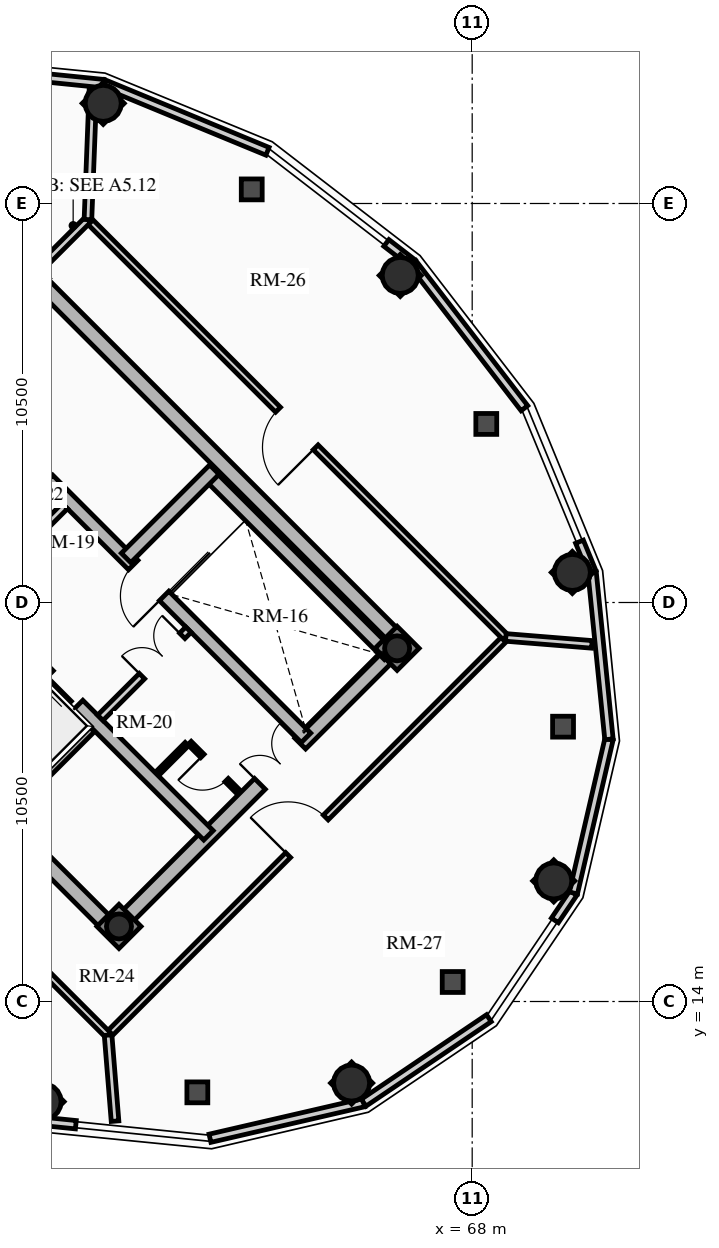
"""IFC4 building model, lengths in metres.
Left out: names, types, materials, properties, quantities, classifications, styles, units other than length and angle.
Written with IfcOpenShell. Run it as: python <this file> out.ifc"""

import sys

from ifc_helpers import new_model, si_unit, direction, frame, frame_2d, origin, origin_2d, place, context, subcontext, project, spatial, rectangle, circle, hollow_circle, extrude, source, transform, mapped, element, fill, save


model = new_model("IFC4")
c1 = context("Model", 3, precision=1e-05, world=origin(), true_north=direction((0.0, 1.0)))
c2 = subcontext(c1, "Body", "Model", "MODEL_VIEW")
j1 = project(units=[si_unit("LENGTHUNIT", "METRE"), si_unit("PLANEANGLEUNIT", "RADIAN")], contexts=[c1])
p1 = place(None, origin())
s1 = spatial("IfcSite", under=j1, at=p1, CompositionType="ELEMENT")
p2 = place(p1, origin())
s2 = spatial("IfcBuilding", under=s1, at=p2, CompositionType="ELEMENT")
p3 = place(p2, frame((0.0, 0.0, 240.33)))
s3 = spatial("IfcBuildingStorey", under=s2, at=p3, CompositionType="ELEMENT", Elevation=240.33)
for number, where, z_axis, x_axis in (
    (1, (58.702, 15.732, 0.0), (0.0, 0.0, 1.0), (-0.707, 0.707, 0.0)),
    (2, (66.268, 23.298, 0.0), (0.0, 0.0, 1.0), (-0.707, 0.707, 0.0)),
):
    element("IfcWall", number, at=place(p3, frame(where, z_axis=z_axis, x_axis=x_axis)), inside=s3, PredefinedType="SHEAR", context=c2, shape_type="SweptSolid", body=[
        extrude(rectangle(XDim=14.1, YDim=0.4, at=frame_2d((7.05, 0.0))), origin(), (0.0, 0.0, 1.0), 4.5),
    ])
p4 = place(p3, frame((58.561, 15.873, 0.0), z_axis=(0.0, 0.0, 1.0), x_axis=(0.707106781187, 0.707106781187, 0.0)))
e3 = element("IfcWall", 3, at=p4, inside=s3, PredefinedType="SHEAR", context=c2, shape_type="SweptSolid", body=[
    extrude(rectangle(XDim=10.7, YDim=0.4, at=frame_2d((5.35, 0.0))), origin(), (0.0, 0.0, 1.0), 4.5),
])
m1 = source(origin(), c2, "Body", "SweptSolid", [
    extrude(rectangle(XDim=1.5, YDim=2.02, at=frame_2d((0.75, 1.01))), frame((0.0, 0.21, 0.0), z_axis=(0.0, -1.0, 0.0), x_axis=(1.0, 0.0, 0.0)), (0.0, 0.0, 1.0), 0.42),
])
p5 = place(p4, frame((5.45, 0.0, 0.0)))
e4 = element("IfcOpeningElement", 4, at=p5, cuts=e3, PredefinedType="OPENING", context=c2, shape_type="MappedRepresentation", body=[
    mapped(m1, transform((0.0, 0.0, 0.0), x_axis=(1.0, 0.0, 0.0), y_axis=(0.0, 1.0, 0.0), z_axis=(0.0, 0.0, 1.0), scale=1.0)),
])
p6 = place(p3, frame((61.06, 18.373, 0.0), z_axis=(0.0, 0.0, 1.0), x_axis=(-0.707106781187, 0.707106781187, 0.0)))
e5 = element("IfcWall", 5, at=p6, inside=s3, PredefinedType="SHEAR", context=c2, shape_type="SweptSolid", body=[
    extrude(rectangle(XDim=13.7, YDim=0.35, at=frame_2d((6.85, 0.0))), origin(), (0.0, 0.0, 1.0), 4.5),
])
m2 = source(origin(), c2, "Body", "SweptSolid", [
    extrude(rectangle(XDim=1.1, YDim=2.015, at=frame_2d((0.55, 1.007))), frame((0.0, 0.185, 0.0), z_axis=(0.0, -1.0, 0.0), x_axis=(1.0, 0.0, 0.0)), (0.0, 0.0, 1.0), 0.37),
])
p7 = place(p6, frame((4.85, 0.0, 0.0)))
e6 = element("IfcOpeningElement", 6, at=p7, cuts=e5, PredefinedType="OPENING", context=c2, shape_type="MappedRepresentation", body=[
    mapped(m2, transform((0.0, 0.0, 0.0), x_axis=(1.0, 0.0, 0.0), y_axis=(0.0, 1.0, 0.0), z_axis=(0.0, 0.0, 1.0), scale=1.0)),
])
m3 = source(origin(), c2, "Body", "SweptSolid", [
    extrude(rectangle(XDim=1.15, YDim=2.02, at=frame_2d((0.575, 1.01))), frame((0.0, 0.185, 0.0), z_axis=(0.0, -1.0, 0.0), x_axis=(1.0, 0.0, 0.0)), (0.0, 0.0, 1.0), 0.37),
])
p8 = place(p6, frame((7.27, 0.0, 0.0)))
e7 = element("IfcOpeningElement", 7, at=p8, cuts=e5, PredefinedType="OPENING", context=c2, shape_type="MappedRepresentation", body=[
    mapped(m3, transform((0.0, 0.0, 0.0), x_axis=(1.0, 0.0, 0.0), y_axis=(0.0, 1.0, 0.0), z_axis=(0.0, 0.0, 1.0), scale=1.0)),
])
p9 = place(p3, frame((63.627, 20.94, 0.0), z_axis=(0.0, 0.0, 1.0), x_axis=(-0.707119496762, 0.707094065383, 0.0)))
e8 = element("IfcWall", 8, at=p9, inside=s3, PredefinedType="SHEAR", context=c2, shape_type="SweptSolid", body=[
    extrude(rectangle(XDim=9.6, YDim=0.35, at=frame_2d((4.8, 0.0))), origin(), (0.0, 0.0, 1.0), 4.5),
])
p10 = place(p9, frame((5.28, 0.0, 0.0)))
e9 = element("IfcOpeningElement", 9, at=p10, cuts=e8, PredefinedType="OPENING", context=c2, shape_type="MappedRepresentation", body=[
    mapped(m3, transform((0.0, 0.0, 0.0), x_axis=(1.0, 0.0, 0.0), y_axis=(0.0, 1.0, 0.0), z_axis=(0.0, 0.0, 1.0), scale=1.0)),
])
p11 = place(p3, frame((65.812, 23.125, 0.0), z_axis=(0.0, 0.0, 1.0), x_axis=(-0.707106781187, 0.707106781187, 0.0)))
e10 = element("IfcWall", 10, at=p11, inside=s3, PredefinedType="SHEAR", context=c2, shape_type="SweptSolid", body=[
    extrude(rectangle(XDim=6.695, YDim=0.35, at=frame_2d((3.348, 0.0))), origin(), (0.0, 0.0, 1.0), 4.5),
])
p12 = place(p3, frame((58.893, 25.674, 0.0), z_axis=(0.0, 0.0, 1.0), x_axis=(0.707106781187, 0.707106781187, 0.0)))
e11 = element("IfcWall", 11, at=p12, inside=s3, PredefinedType="SHEAR", context=c2, shape_type="SweptSolid", body=[
    extrude(rectangle(XDim=3.285, YDim=0.35, at=frame_2d((1.643, 0.0))), origin(), (0.0, 0.0, 1.0), 4.5),
])
for number, where, z_axis, x_axis in (
    (12, (58.706, 15.976, 0.0), (0.0, 0.0, 1.0), (0.707, 0.707, 0.0)),
    (13, (66.024, 23.294, 0.0), (0.0, 0.0, 1.0), (0.707, 0.707, 0.0)),
):
    element("IfcColumn", number, at=place(p3, frame(where, z_axis=z_axis, x_axis=x_axis)), inside=s3, PredefinedType="COLUMN", context=c2, shape_type="SweptSolid", body=[
        extrude(hollow_circle(Radius=0.33, WallThickness=0.025, at=origin_2d()), origin(), (0.0, 0.0, 1.0), 4.5),
    ])
for number, where, z_axis, x_axis in (
    (14, (66.107, 33.107, 0.0), (0.0, 0.0, 1.0), (1.0, 0.0, 0.0)),
    (15, (58.291, 37.635, 0.0), (0.0, 0.0, 1.0), (1.0, 0.0, 0.0)),
    (16, (56.709, 11.365, 0.0), (0.0, 0.0, 1.0), (1.0, 0.0, 0.0)),
    (17, (64.827, 11.854, 0.0), (0.0, 0.0, 1.0), (1.0, 0.0, 0.0)),
    (18, (70.146, 17.173, 0.0), (0.0, 0.0, 1.0), (1.0, 0.0, 0.0)),
    (19, (70.635, 25.291, 0.0), (0.0, 0.0, 1.0), (1.0, 0.0, 0.0)),
):
    element("IfcColumn", number, at=place(p3, frame(where, z_axis=z_axis, x_axis=x_axis)), inside=s3, PredefinedType="COLUMN", context=c2, shape_type="SweptSolid", body=[
        extrude(circle(Radius=0.475, at=origin_2d()), origin(), (0.0, 0.0, 1.0), 4.5),
    ])
p13 = place(p3, frame((65.742, 33.962, 0.0), z_axis=(0.0, 0.0, 1.0), x_axis=(0.792154336817, -0.610320822734, 0.0)))
e20 = element("IfcWall", 20, at=p13, inside=s3, PredefinedType="SOLIDWALL", context=c2, shape_type="SweptSolid", body=[
    extrude(rectangle(XDim=0.87, YDim=0.22, at=frame_2d((0.435, 0.0))), origin(), (0.0, 0.0, 1.0), 3.556),
])
p14 = place(p3, frame((58.295, 38.155, 0.0), z_axis=(0.0, 0.0, 1.0), x_axis=(0.924447353237, -0.381309704956, 0.0)))
e21 = element("IfcWall", 21, at=p14, inside=s3, PredefinedType="SOLIDWALL", context=c2, shape_type="SweptSolid", body=[
    extrude(rectangle(XDim=4.671, YDim=0.22, at=frame_2d((2.335, 0.0))), origin(), (0.0, 0.0, 1.0), 3.556),
])
p15 = place(p3, frame((53.9, 38.599, 0.0), z_axis=(0.0, 0.0, 1.0), x_axis=(0.994929930991, -0.100570534541, 0.0)))
e22 = element("IfcWall", 22, at=p15, inside=s3, PredefinedType="SOLIDWALL", context=c2, shape_type="SweptSolid", body=[
    extrude(rectangle(XDim=4.418, YDim=0.22, at=frame_2d((2.209, 0.0))), origin(), (0.0, 0.0, 1.0), 3.556),
])
p16 = place(p3, frame((57.57, 10.758, 0.0), z_axis=(0.0, 0.0, 1.0), x_axis=(-0.994914209363, 0.100725945054, 0.0)))
e23 = element("IfcWall", 23, at=p16, inside=s3, PredefinedType="SOLIDWALL", context=c2, shape_type="SweptSolid", body=[
    extrude(rectangle(XDim=0.87, YDim=0.22, at=frame_2d((0.435, 0.0))), origin(), (0.0, 0.0, 1.0), 3.556),
])
p17 = place(p3, frame((65.144, 11.337, 0.0), z_axis=(0.0, 0.0, 1.0), x_axis=(-0.974249228678, -0.225473813158, 0.0)))
e24 = element("IfcWall", 24, at=p17, inside=s3, PredefinedType="SOLIDWALL", context=c2, shape_type="SweptSolid", body=[
    extrude(rectangle(XDim=4.15, YDim=0.22, at=frame_2d((2.075, 0.0))), origin(), (0.0, 0.0, 1.0), 3.556),
])
p18 = place(p3, frame((68.439, 13.561, 0.0), z_axis=(0.0, 0.0, 1.0), x_axis=(-0.828833723692, -0.559495003079, 0.0)))
e25 = element("IfcWall", 25, at=p18, inside=s3, PredefinedType="SOLIDWALL", context=c2, shape_type="SweptSolid", body=[
    extrude(rectangle(XDim=3.976, YDim=0.22, at=frame_2d((1.988, 0.0))), origin(), (0.0, 0.0, 1.0), 3.556),
])
p19 = place(p3, frame((70.663, 16.856, 0.0), z_axis=(0.0, 0.0, 1.0), x_axis=(-0.559482492851, -0.828842168446, 0.0)))
e26 = element("IfcWall", 26, at=p19, inside=s3, PredefinedType="SOLIDWALL", context=c2, shape_type="SweptSolid", body=[
    extrude(rectangle(XDim=0.87, YDim=0.22, at=frame_2d((0.435, 0.0))), origin(), (0.0, 0.0, 1.0), 3.556),
])
p20 = place(p3, frame((71.599, 20.9, 0.0), z_axis=(0.0, 0.0, 1.0), x_axis=(-0.225473813158, -0.974249228678, 0.0)))
e27 = element("IfcWall", 27, at=p20, inside=s3, PredefinedType="SOLIDWALL", context=c2, shape_type="SweptSolid", body=[
    extrude(rectangle(XDim=4.15, YDim=0.22, at=frame_2d((2.075, 0.0))), origin(), (0.0, 0.0, 1.0), 3.556),
])
p21 = place(p3, frame((71.155, 25.295, 0.0), z_axis=(0.0, 0.0, 1.0), x_axis=(0.100570534541, -0.994929930991, 0.0)))
e28 = element("IfcWall", 28, at=p21, inside=s3, PredefinedType="SOLIDWALL", context=c2, shape_type="SweptSolid", body=[
    extrude(rectangle(XDim=4.418, YDim=0.22, at=frame_2d((2.209, 0.0))), origin(), (0.0, 0.0, 1.0), 3.556),
])
p22 = place(p3, frame((70.823, 26.1, 0.0), z_axis=(0.0, 0.0, 1.0), x_axis=(0.381145028536, -0.924515260676, 0.0)))
e29 = element("IfcWall", 29, at=p22, inside=s3, PredefinedType="SOLIDWALL", context=c2, shape_type="SweptSolid", body=[
    extrude(rectangle(XDim=0.87, YDim=0.22, at=frame_2d((0.435, 0.0))), origin(), (0.0, 0.0, 1.0), 3.556),
])
p23 = place(p3, frame((66.431, 33.431, 0.0), z_axis=(0.0, 0.0, 1.0), x_axis=(0.610523083886, -0.791998462147, 0.0)))
e30 = element("IfcWall", 30, at=p23, inside=s3, PredefinedType="SOLIDWALL", context=c2, shape_type="SweptSolid", body=[
    extrude(rectangle(XDim=4.82, YDim=0.22, at=frame_2d((2.41, 0.0))), origin(), (0.0, 0.0, 1.0), 3.556),
])
p24 = place(p3, frame((55.888, 19.069, 0.0), z_axis=(0.0, 0.0, 1.0), x_axis=(0.707106781187, 0.707106781187, 0.0)))
e31 = element("IfcWall", 31, at=p24, inside=s3, PredefinedType="SHEAR", context=c2, shape_type="SweptSolid", body=[
    extrude(rectangle(XDim=2.97, YDim=0.2, at=frame_2d((1.485, 0.0))), origin(), (0.0, 0.0, 1.0), 4.5),
])
p25 = place(p3, frame((58.214, 21.467, 0.0), z_axis=(0.0, 0.0, 1.0), x_axis=(0.707106781187, 0.707106781187, 0.0)))
e32 = element("IfcWall", 32, at=p25, inside=s3, PredefinedType="PARTITIONING", context=c2, shape_type="SweptSolid", body=[
    extrude(rectangle(XDim=3.28, YDim=0.2, at=frame_2d((1.64, 0.0))), origin(), (0.0, 0.0, 1.0), 4.185),
])
m4 = source(origin(), c2, "Body", "SweptSolid", [
    extrude(rectangle(XDim=1.5, YDim=2.02, at=frame_2d((0.75, 1.01))), frame((0.0, 0.11, 0.0), z_axis=(0.0, -1.0, 0.0), x_axis=(1.0, 0.0, 0.0)), (0.0, 0.0, 1.0), 0.22),
])
p26 = place(p25, frame((1.55, 0.0, 0.0)))
e33 = element("IfcOpeningElement", 33, at=p26, cuts=e32, PredefinedType="OPENING", context=c2, shape_type="MappedRepresentation", body=[
    mapped(m4, transform((0.0, 0.0, 0.0), x_axis=(1.0, 0.0, 0.0), y_axis=(0.0, 1.0, 0.0), z_axis=(0.0, 0.0, 1.0), scale=1.0)),
])
p27 = place(p3, frame((54.961, 24.719, 0.0), z_axis=(0.0, 0.0, 1.0), x_axis=(0.707106781187, 0.707106781187, 0.0)))
e34 = element("IfcWall", 34, at=p27, inside=s3, PredefinedType="PARTITIONING", context=c2, shape_type="SweptSolid", body=[
    extrude(rectangle(XDim=3.28, YDim=0.2, at=frame_2d((1.64, 0.0))), origin(), (0.0, 0.0, 1.0), 4.185),
])
m5 = source(origin(), c2, "Body", "SweptSolid", [
    extrude(rectangle(XDim=0.9, YDim=2.005, at=frame_2d((0.45, 1.002))), frame((0.0, 0.11, 0.0), z_axis=(0.0, -1.0, 0.0), x_axis=(1.0, 0.0, 0.0)), (0.0, 0.0, 1.0), 0.22),
])
p28 = place(p27, frame((0.16, 0.0, 0.0)))
e35 = element("IfcOpeningElement", 35, at=p28, cuts=e34, PredefinedType="OPENING", context=c2, shape_type="MappedRepresentation", body=[
    mapped(m5, transform((0.0, 0.0, 0.0), x_axis=(1.0, 0.0, 0.0), y_axis=(0.0, 1.0, 0.0), z_axis=(0.0, 0.0, 1.0), scale=1.0)),
])
p29 = place(p3, frame((61.835, 19.529, 0.0), z_axis=(0.0, 0.0, 1.0), x_axis=(-0.707174592913, 0.707038962956, 0.0)))
e36 = element("IfcWall", 36, at=p29, inside=s3, PredefinedType="PARTITIONING", context=c2, shape_type="SweptSolid", body=[
    extrude(rectangle(XDim=1.8, YDim=0.125, at=frame_2d((0.9, 0.0))), origin(), (0.0, 0.0, 1.0), 4.185),
])
m6 = source(origin(), c2, "Body", "SweptSolid", [
    extrude(rectangle(XDim=0.9, YDim=2.005, at=frame_2d((0.45, 1.002))), frame((0.0, 0.073, 0.0), z_axis=(0.0, -1.0, 0.0), x_axis=(1.0, 0.0, 0.0)), (0.0, 0.0, 1.0), 0.145),
])
p30 = place(p29, frame((0.42, 0.0, 0.0)))
e37 = element("IfcOpeningElement", 37, at=p30, cuts=e36, PredefinedType="OPENING", context=c2, shape_type="MappedRepresentation", body=[
    mapped(m6, transform((0.0, 0.0, 0.0), x_axis=(1.0, 0.0, 0.0), y_axis=(0.0, 1.0, 0.0), z_axis=(0.0, 0.0, 1.0), scale=1.0)),
])
p31 = place(p3, frame((59.713, 19.996, 0.0), z_axis=(0.0, 0.0, 1.0), x_axis=(0.707217726, 0.706995818963, 0.0)))
e38 = element("IfcWall", 38, at=p31, inside=s3, PredefinedType="PARTITIONING", context=c2, shape_type="SweptSolid", body=[
    extrude(rectangle(XDim=1.1, YDim=0.125, at=frame_2d((0.55, 0.0))), origin(), (0.0, 0.0, 1.0), 4.185),
])
p32 = place(p3, frame((58.419, 13.115, 0.0), z_axis=(0.0, 0.0, 1.0), x_axis=(0.707106781187, 0.707106781187, 0.0)))
e39 = element("IfcWall", 39, at=p32, inside=s3, PredefinedType="PARTITIONING", context=c2, shape_type="SweptSolid", body=[
    extrude(rectangle(XDim=14.8, YDim=0.18, at=frame_2d((7.4, 0.0))), origin(), (0.0, 0.0, 1.0), 3.476),
])
m7 = source(origin(), c2, "Body", "SweptSolid", [
    extrude(rectangle(XDim=1.4, YDim=2.02, at=frame_2d((0.7, 1.01))), frame((0.0, 0.1, 0.0), z_axis=(0.0, -1.0, 0.0), x_axis=(1.0, 0.0, 0.0)), (0.0, 0.0, 1.0), 0.2),
])
p33 = place(p32, frame((6.7, 0.0, 0.0)))
e40 = element("IfcOpeningElement", 40, at=p33, cuts=e39, PredefinedType="OPENING", context=c2, shape_type="MappedRepresentation", body=[
    mapped(m7, transform((0.0, 0.0, 0.0), x_axis=(1.0, 0.0, 0.0), y_axis=(0.0, 1.0, 0.0), z_axis=(0.0, 0.0, 1.0), scale=1.0)),
])
p34 = place(p3, frame((58.419, 13.115, 0.0), z_axis=(0.0, 0.0, 1.0), x_axis=(-0.707106781187, 0.707106781187, 0.0)))
e41 = element("IfcWall", 41, at=p34, inside=s3, PredefinedType="PARTITIONING", context=c2, shape_type="SweptSolid", body=[
    extrude(rectangle(XDim=15.55, YDim=0.18, at=frame_2d((7.775, 0.0))), origin(), (0.0, 0.0, 1.0), 3.476),
])
p35 = place(p34, frame((7.075, 0.0, 0.0)))
e42 = element("IfcOpeningElement", 42, at=p35, cuts=e41, PredefinedType="OPENING", context=c2, shape_type="MappedRepresentation", body=[
    mapped(m7, transform((0.0, 0.0, 0.0), x_axis=(1.0, 0.0, 0.0), y_axis=(0.0, 1.0, 0.0), z_axis=(0.0, 0.0, 1.0), scale=1.0)),
])
p36 = place(p3, frame((68.885, 23.581, 0.0), z_axis=(0.0, 0.0, 1.0), x_axis=(-0.707106781187, 0.707106781187, 0.0)))
e43 = element("IfcWall", 43, at=p36, inside=s3, PredefinedType="PARTITIONING", context=c2, shape_type="SweptSolid", body=[
    extrude(rectangle(XDim=15.55, YDim=0.18, at=frame_2d((7.775, 0.0))), origin(), (0.0, 0.0, 1.0), 3.476),
])
p37 = place(p36, frame((7.075, 0.0, 0.0)))
e44 = element("IfcOpeningElement", 44, at=p37, cuts=e43, PredefinedType="OPENING", context=c2, shape_type="MappedRepresentation", body=[
    mapped(m7, transform((0.0, 0.0, 0.0), x_axis=(1.0, 0.0, 0.0), y_axis=(0.0, 1.0, 0.0), z_axis=(0.0, 0.0, 1.0), scale=1.0)),
])
p38 = place(p3, frame((56.581, 33.268, 0.0), z_axis=(0.0, 0.0, 1.0), x_axis=(0.707040798191, 0.707172758026, 0.0)))
e45 = element("IfcWall", 45, at=p38, inside=s3, PredefinedType="PARTITIONING", context=c2, shape_type="SweptSolid", body=[
    extrude(rectangle(XDim=1.85, YDim=0.2, at=frame_2d((0.925, 0.0))), origin(), (0.0, 0.0, 1.0), 3.476),
])
p39 = place(p3, frame((57.889, 34.576, 0.0), z_axis=(0.0, 0.0, 1.0), x_axis=(0.038606420501, 0.999254494259, 0.0)))
e46 = element("IfcWall", 46, at=p39, inside=s3, PredefinedType="PARTITIONING", context=c2, shape_type="SweptSolid", body=[
    extrude(rectangle(XDim=3.408, YDim=0.2, at=frame_2d((1.704, 0.0))), origin(), (0.0, 0.0, 1.0), 3.476),
])
for number, where, z_axis, x_axis in (
    (47, (68.885, 23.581, 0.0), (0.0, 0.0, 1.0), (0.997, -0.081, 0.0)),
    (48, (58.419, 13.115, 0.0), (0.0, 0.0, 1.0), (0.081, -0.997, 0.0)),
):
    element("IfcWall", number, at=place(p3, frame(where, z_axis=z_axis, x_axis=x_axis)), inside=s3, PredefinedType="PARTITIONING", context=c2, shape_type="SweptSolid", body=[
        extrude(rectangle(XDim=2.271, YDim=0.2, at=frame_2d((1.136, 0.0))), origin(), (0.0, 0.0, 1.0), 3.556),
    ])
m8 = source(origin(), c2, "Body", "SweptSolid", [
    extrude(rectangle(XDim=1.1, YDim=2.015, at=frame_2d((0.55, 1.007))), frame((0.0, 0.025, 0.0), z_axis=(0.0, -1.0, 0.0), x_axis=(1.0, 0.0, 0.0)), (0.0, 0.0, 1.0), 0.05),
])
p40 = place(p7, origin())
e49 = element("IfcDoor", 49, at=p40, inside=s3, OperationType="SLIDING_TO_RIGHT", PredefinedType="DOOR", context=c2, shape_type="MappedRepresentation", body=[
    mapped(m8, transform((0.0, 0.0, 0.0), x_axis=(1.0, 0.0, 0.0), y_axis=(0.0, 1.0, 0.0), z_axis=(0.0, 0.0, 1.0), scale=1.0)),
])
fill(e6, e49)
m9 = source(origin(), c2, "Body", "SweptSolid", [
    extrude(rectangle(XDim=1.15, YDim=2.02, at=frame_2d((0.575, 1.01))), frame((0.0, 0.025, 0.0), z_axis=(0.0, -1.0, 0.0), x_axis=(1.0, 0.0, 0.0)), (0.0, 0.0, 1.0), 0.05),
])
p41 = place(p10, origin())
e50 = element("IfcDoor", 50, at=p41, inside=s3, OperationType="SINGLE_SWING_LEFT", PredefinedType="DOOR", context=c2, shape_type="MappedRepresentation", body=[
    mapped(m9, transform((0.0, 0.0, 0.0), x_axis=(1.0, 0.0, 0.0), y_axis=(0.0, 1.0, 0.0), z_axis=(0.0, 0.0, 1.0), scale=1.0)),
])
fill(e9, e50)
m10 = source(origin(), c2, "Body", "SweptSolid", [
    extrude(rectangle(XDim=1.5, YDim=2.02, at=frame_2d((0.75, 1.01))), frame((0.0, 0.025, 0.0), z_axis=(0.0, -1.0, 0.0), x_axis=(1.0, 0.0, 0.0)), (0.0, 0.0, 1.0), 0.05),
])
p42 = place(p5, origin())
e51 = element("IfcDoor", 51, at=p42, inside=s3, OperationType="DOUBLE_DOOR_SINGLE_SWING", PredefinedType="DOOR", context=c2, shape_type="MappedRepresentation", body=[
    mapped(m10, transform((0.0, 0.0, 0.0), x_axis=(1.0, 0.0, 0.0), y_axis=(0.0, 1.0, 0.0), z_axis=(0.0, 0.0, 1.0), scale=1.0)),
])
fill(e4, e51)
p43 = place(p26, origin())
e52 = element("IfcDoor", 52, at=p43, inside=s3, OperationType="DOUBLE_DOOR_SINGLE_SWING", PredefinedType="DOOR", context=c2, shape_type="MappedRepresentation", body=[
    mapped(m10, transform((0.0, 0.0, 0.0), x_axis=(1.0, 0.0, 0.0), y_axis=(0.0, 1.0, 0.0), z_axis=(0.0, 0.0, 1.0), scale=1.0)),
])
fill(e33, e52)
m11 = source(origin(), c2, "Body", "SweptSolid", [
    extrude(rectangle(XDim=0.9, YDim=2.005, at=frame_2d((0.45, 1.002))), frame((0.0, 0.025, 0.0), z_axis=(0.0, -1.0, 0.0), x_axis=(1.0, 0.0, 0.0)), (0.0, 0.0, 1.0), 0.05),
])
p44 = place(p30, origin())
e53 = element("IfcDoor", 53, at=p44, inside=s3, OperationType="SINGLE_SWING_RIGHT", PredefinedType="DOOR", context=c2, shape_type="MappedRepresentation", body=[
    mapped(m11, transform((0.0, 0.0, 0.0), x_axis=(1.0, 0.0, 0.0), y_axis=(0.0, 1.0, 0.0), z_axis=(0.0, 0.0, 1.0), scale=1.0)),
])
fill(e37, e53)
m12 = source(origin(), c2, "Body", "SweptSolid", [
    extrude(rectangle(XDim=1.4, YDim=2.02, at=frame_2d((0.7, 1.01))), frame((0.0, 0.025, 0.0), z_axis=(0.0, -1.0, 0.0), x_axis=(1.0, 0.0, 0.0)), (0.0, 0.0, 1.0), 0.05),
])
p45 = place(p33, origin())
e54 = element("IfcDoor", 54, at=p45, inside=s3, OperationType="SINGLE_SWING_LEFT", PredefinedType="DOOR", context=c2, shape_type="MappedRepresentation", body=[
    mapped(m12, transform((0.0, 0.0, 0.0), x_axis=(1.0, 0.0, 0.0), y_axis=(0.0, 1.0, 0.0), z_axis=(0.0, 0.0, 1.0), scale=1.0)),
])
fill(e40, e54)
p46 = place(p37, origin())
e55 = element("IfcDoor", 55, at=p46, inside=s3, OperationType="SINGLE_SWING_LEFT", PredefinedType="DOOR", context=c2, shape_type="MappedRepresentation", body=[
    mapped(m12, transform((0.0, 0.0, 0.0), x_axis=(1.0, 0.0, 0.0), y_axis=(0.0, 1.0, 0.0), z_axis=(0.0, 0.0, 1.0), scale=1.0)),
])
fill(e44, e55)
save(model, sys.argv[1])
